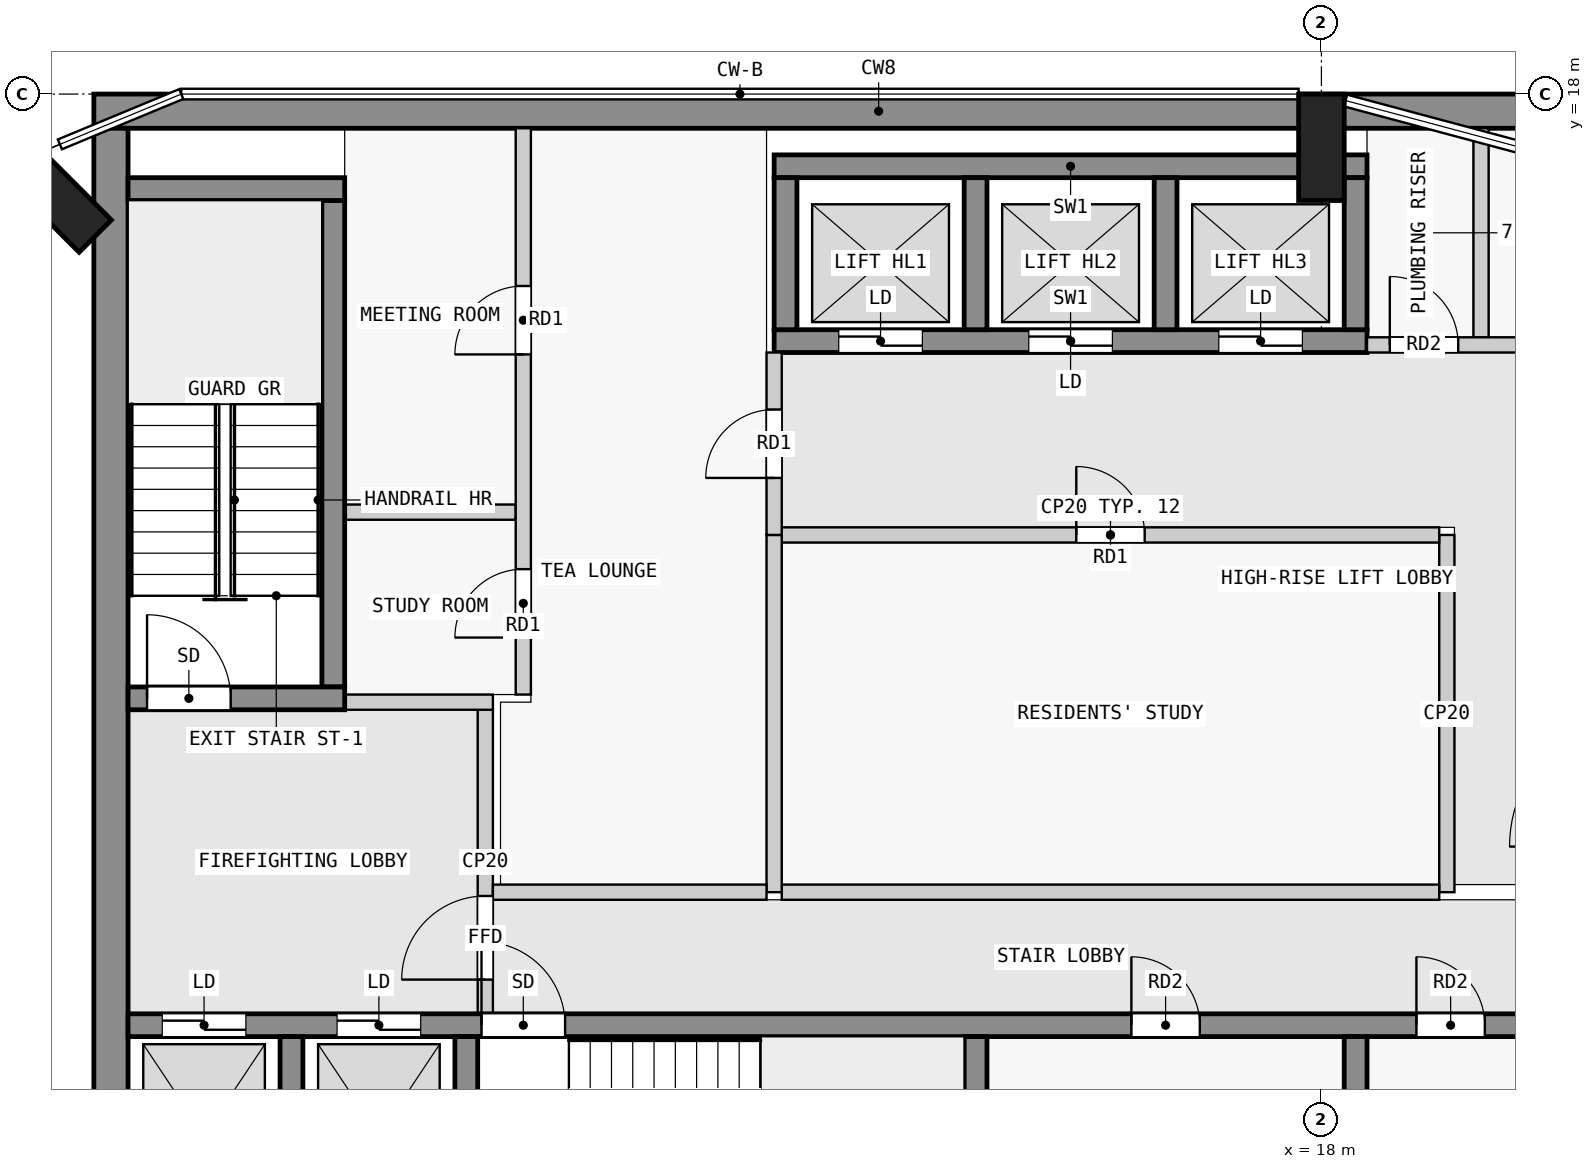
"""IFC4 building model, lengths in metres.
Left out: names, types, materials, properties, quantities, classifications, styles, units other than length and angle.
Written with IfcOpenShell. Run it as: python <this file> out.ifc"""

import sys

from ifc_helpers import new_model, si_unit, direction, frame, frame_2d, origin, origin_2d, place, context, subcontext, project, spatial, rectangle, extrude, element, fill, save


model = new_model("IFC4")
c1 = context("Model", 3, precision=1e-05, world=origin(), true_north=direction((0.0, 1.0)))
c2 = subcontext(c1, "Body", "Model", "MODEL_VIEW")
j1 = project(units=[si_unit("LENGTHUNIT", "METRE"), si_unit("PLANEANGLEUNIT", "RADIAN")], contexts=[c1])
p1 = place(None, origin())
s1 = spatial("IfcSite", under=j1, at=p1, CompositionType="ELEMENT")
p2 = place(p1, origin())
s2 = spatial("IfcBuilding", under=s1, at=p2, CompositionType="ELEMENT")
p3 = place(p2, frame((0.0, 0.0, 270.4)))
s3 = spatial("IfcBuildingStorey", under=s2, at=p3, CompositionType="ELEMENT", Elevation=270.4)
for number, where, z_axis, x_axis in (
    (1, (18.0, 17.3, 0.0), (0.0, 0.0, 1.0), (1.0, 0.0, 0.0)),
    (2, (1.374, 16.626, 0.0), (0.0, 0.0, 1.0), (0.707, 0.707, 0.0)),
):
    element("IfcColumn", number, at=place(p3, frame(where, z_axis=z_axis, x_axis=x_axis)), inside=s3, PredefinedType="COLUMN", context=c2, shape_type="SweptSolid", body=[
        extrude(rectangle(XDim=0.6, YDim=1.4, at=origin_2d()), origin(), (0.0, 0.0, 1.0), 3.5),
    ])
p4 = place(p3, frame((1.85, 17.775, 0.0), z_axis=(0.0, 0.0, 1.0), x_axis=(1.0, 0.0, 0.0)))
e3 = element("IfcWall", 3, at=p4, inside=s3, PredefinedType="SHEAR", context=c2, shape_type="SweptSolid", body=[
    extrude(rectangle(XDim=20.65, YDim=0.45, at=frame_2d((10.325, 0.0))), origin(), (0.0, 0.0, 1.0), 3.25),
])
p5 = place(p3, frame((2.075, 2.5, 0.0), z_axis=(0.0, 0.0, 1.0), x_axis=(0.0, 1.0, 0.0)))
e4 = element("IfcWall", 4, at=p5, inside=s3, PredefinedType="SHEAR", context=c2, shape_type="SweptSolid", body=[
    extrude(rectangle(XDim=15.05, YDim=0.45, at=frame_2d((7.525, 0.0))), origin(), (0.0, 0.0, 1.0), 3.25),
])
for number, where, z_axis, x_axis in (
    (5, (4.45, 2.8, 0.0), (0.0, 0.0, 1.0), (0.0, 1.0, 0.0)),
    (6, (6.75, 2.8, 0.0), (0.0, 0.0, 1.0), (0.0, 1.0, 0.0)),
    (7, (13.45, 2.8, 0.0), (0.0, 0.0, 1.0), (0.0, 1.0, 0.0)),
    (8, (18.45, 2.8, 0.0), (0.0, 0.0, 1.0), (0.0, 1.0, 0.0)),
):
    element("IfcWall", number, at=place(p3, frame(where, z_axis=z_axis, x_axis=x_axis)), inside=s3, PredefinedType="SHEAR", context=c2, shape_type="SweptSolid", body=[
        extrude(rectangle(XDim=2.8, YDim=0.3, at=frame_2d((1.4, 0.0))), origin(), (0.0, 0.0, 1.0), 3.25),
    ])
p6 = place(p3, frame((2.3, 5.75, 0.0), z_axis=(0.0, 0.0, 1.0), x_axis=(1.0, 0.0, 0.0)))
e9 = element("IfcWall", 9, at=p6, inside=s3, PredefinedType="SHEAR", context=c2, shape_type="SweptSolid", body=[
    extrude(rectangle(XDim=18.8, YDim=0.3, at=frame_2d((9.4, 0.0))), origin(), (0.0, 0.0, 1.0), 3.25),
])
p7 = place(p6, frame((4.65, 0.0, 0.0)))
e10 = element("IfcOpeningElement", 10, at=p7, cuts=e9, PredefinedType="OPENING", context=c2, shape_type="SweptSolid", body=[
    extrude(rectangle(XDim=1.1, YDim=2.1, at=frame_2d((0.55, 1.05))), frame((0.0, 0.16, 0.0), z_axis=(0.0, -1.0, 0.0), x_axis=(1.0, 0.0, 0.0)), (0.0, 0.0, 1.0), 0.32),
])
p8 = place(p6, frame((0.45, 0.0, 0.0)))
e11 = element("IfcOpeningElement", 11, at=p8, cuts=e9, PredefinedType="OPENING", context=c2, shape_type="SweptSolid", body=[
    extrude(rectangle(XDim=1.1, YDim=2.1, at=frame_2d((0.55, 1.05))), frame((0.0, 0.16, 0.0), z_axis=(0.0, -1.0, 0.0), x_axis=(1.0, 0.0, 0.0)), (0.0, 0.0, 1.0), 0.32),
])
p9 = place(p6, frame((2.75, 0.0, 0.0)))
e12 = element("IfcOpeningElement", 12, at=p9, cuts=e9, PredefinedType="OPENING", context=c2, shape_type="SweptSolid", body=[
    extrude(rectangle(XDim=1.1, YDim=2.1, at=frame_2d((0.55, 1.05))), frame((0.0, 0.16, 0.0), z_axis=(0.0, -1.0, 0.0), x_axis=(1.0, 0.0, 0.0)), (0.0, 0.0, 1.0), 0.32),
])
p10 = place(p6, frame((13.2, 0.0, 0.0)))
e13 = element("IfcOpeningElement", 13, at=p10, cuts=e9, PredefinedType="OPENING", context=c2, shape_type="SweptSolid", body=[
    extrude(rectangle(XDim=0.9, YDim=2.1, at=frame_2d((0.45, 1.05))), frame((0.0, 0.16, 0.0), z_axis=(0.0, -1.0, 0.0), x_axis=(1.0, 0.0, 0.0)), (0.0, 0.0, 1.0), 0.32),
])
p11 = place(p6, frame((16.95, 0.0, 0.0)))
e14 = element("IfcOpeningElement", 14, at=p11, cuts=e9, PredefinedType="OPENING", context=c2, shape_type="SweptSolid", body=[
    extrude(rectangle(XDim=0.9, YDim=2.1, at=frame_2d((0.45, 1.05))), frame((0.0, 0.16, 0.0), z_axis=(0.0, -1.0, 0.0), x_axis=(1.0, 0.0, 0.0)), (0.0, 0.0, 1.0), 0.32),
])
p12 = place(p3, frame((2.3, 10.05, 0.0), z_axis=(0.0, 0.0, 1.0), x_axis=(1.0, 0.0, 0.0)))
e15 = element("IfcWall", 15, at=p12, inside=s3, PredefinedType="SHEAR", context=c2, shape_type="SweptSolid", body=[
    extrude(rectangle(XDim=2.85, YDim=0.3, at=frame_2d((1.425, 0.0))), origin(), (0.0, 0.0, 1.0), 3.25),
])
p13 = place(p12, frame((0.25, 0.0, 0.0)))
e16 = element("IfcOpeningElement", 16, at=p13, cuts=e15, PredefinedType="OPENING", context=c2, shape_type="SweptSolid", body=[
    extrude(rectangle(XDim=1.1, YDim=2.1, at=frame_2d((0.55, 1.05))), frame((0.0, 0.16, 0.0), z_axis=(0.0, -1.0, 0.0), x_axis=(1.0, 0.0, 0.0)), (0.0, 0.0, 1.0), 0.32),
])
p14 = place(p3, frame((5.0, 10.2, 0.0), z_axis=(0.0, 0.0, 1.0), x_axis=(0.0, 1.0, 0.0)))
e17 = element("IfcWall", 17, at=p14, inside=s3, PredefinedType="SHEAR", context=c2, shape_type="SweptSolid", body=[
    extrude(rectangle(XDim=6.4, YDim=0.3, at=frame_2d((3.2, 0.0))), origin(), (0.0, 0.0, 1.0), 3.25),
])
p15 = place(p3, frame((2.3, 16.75, 0.0), z_axis=(0.0, 0.0, 1.0), x_axis=(1.0, 0.0, 0.0)))
e18 = element("IfcWall", 18, at=p15, inside=s3, PredefinedType="SHEAR", context=c2, shape_type="SweptSolid", body=[
    extrude(rectangle(XDim=2.85, YDim=0.3, at=frame_2d((1.425, 0.0))), origin(), (0.0, 0.0, 1.0), 3.25),
])
p16 = place(p3, frame((10.8, 17.05, 0.0), z_axis=(0.0, 0.0, 1.0), x_axis=(1.0, 0.0, 0.0)))
e19 = element("IfcWall", 19, at=p16, inside=s3, PredefinedType="SHEAR", context=c2, shape_type="SweptSolid", body=[
    extrude(rectangle(XDim=7.8, YDim=0.3, at=frame_2d((3.9, 0.0))), origin(), (0.0, 0.0, 1.0), 3.25),
])
p17 = place(p3, frame((10.8, 14.75, 0.0), z_axis=(0.0, 0.0, 1.0), x_axis=(1.0, 0.0, 0.0)))
e20 = element("IfcWall", 20, at=p17, inside=s3, PredefinedType="SHEAR", context=c2, shape_type="SweptSolid", body=[
    extrude(rectangle(XDim=7.8, YDim=0.3, at=frame_2d((3.9, 0.0))), origin(), (0.0, 0.0, 1.0), 3.25),
])
p18 = place(p17, frame((0.85, 0.0, 0.0)))
e21 = element("IfcOpeningElement", 21, at=p18, cuts=e20, PredefinedType="OPENING", context=c2, shape_type="SweptSolid", body=[
    extrude(rectangle(XDim=1.1, YDim=2.1, at=frame_2d((0.55, 1.05))), frame((0.0, 0.16, 0.0), z_axis=(0.0, -1.0, 0.0), x_axis=(1.0, 0.0, 0.0)), (0.0, 0.0, 1.0), 0.32),
])
p19 = place(p17, frame((3.35, 0.0, 0.0)))
e22 = element("IfcOpeningElement", 22, at=p19, cuts=e20, PredefinedType="OPENING", context=c2, shape_type="SweptSolid", body=[
    extrude(rectangle(XDim=1.1, YDim=2.1, at=frame_2d((0.55, 1.05))), frame((0.0, 0.16, 0.0), z_axis=(0.0, -1.0, 0.0), x_axis=(1.0, 0.0, 0.0)), (0.0, 0.0, 1.0), 0.32),
])
p20 = place(p17, frame((5.85, 0.0, 0.0)))
e23 = element("IfcOpeningElement", 23, at=p20, cuts=e20, PredefinedType="OPENING", context=c2, shape_type="SweptSolid", body=[
    extrude(rectangle(XDim=1.1, YDim=2.1, at=frame_2d((0.55, 1.05))), frame((0.0, 0.16, 0.0), z_axis=(0.0, -1.0, 0.0), x_axis=(1.0, 0.0, 0.0)), (0.0, 0.0, 1.0), 0.32),
])
for number, where, z_axis, x_axis in (
    (24, (10.95, 14.9, 0.0), (0.0, 0.0, 1.0), (0.0, 1.0, 0.0)),
    (25, (13.45, 14.9, 0.0), (0.0, 0.0, 1.0), (0.0, 1.0, 0.0)),
    (26, (15.95, 14.9, 0.0), (0.0, 0.0, 1.0), (0.0, 1.0, 0.0)),
    (27, (18.45, 14.9, 0.0), (0.0, 0.0, 1.0), (0.0, 1.0, 0.0)),
):
    element("IfcWall", number, at=place(p3, frame(where, z_axis=z_axis, x_axis=x_axis)), inside=s3, PredefinedType="SHEAR", context=c2, shape_type="SweptSolid", body=[
        extrude(rectangle(XDim=2.0, YDim=0.3, at=frame_2d((1.0, 0.0))), origin(), (0.0, 0.0, 1.0), 3.25),
    ])
p21 = place(p3, frame((7.0, 5.9, 0.0), z_axis=(0.0, 0.0, 1.0), x_axis=(0.0, 1.0, 0.0)))
e28 = element("IfcWall", 28, at=p21, inside=s3, PredefinedType="PARTITIONING", context=c2, shape_type="SweptSolid", body=[
    extrude(rectangle(XDim=4.0, YDim=0.2, at=frame_2d((2.0, 0.0))), origin(), (0.0, 0.0, 1.0), 3.25),
])
p22 = place(p21, frame((0.45, 0.0, 0.0)))
e29 = element("IfcOpeningElement", 29, at=p22, cuts=e28, PredefinedType="OPENING", context=c2, shape_type="SweptSolid", body=[
    extrude(rectangle(XDim=1.1, YDim=2.1, at=frame_2d((0.55, 1.05))), frame((0.0, 0.11, 0.0), z_axis=(0.0, -1.0, 0.0), x_axis=(1.0, 0.0, 0.0)), (0.0, 0.0, 1.0), 0.22),
])
p23 = place(p3, frame((5.15, 10.0, 0.0), z_axis=(0.0, 0.0, 1.0), x_axis=(1.0, 0.0, 0.0)))
e30 = element("IfcWall", 30, at=p23, inside=s3, PredefinedType="PARTITIONING", context=c2, shape_type="SweptSolid", body=[
    extrude(rectangle(XDim=1.95, YDim=0.2, at=frame_2d((0.975, 0.0))), origin(), (0.0, 0.0, 1.0), 3.25),
])
p24 = place(p3, frame((7.1, 7.5, 0.0), z_axis=(0.0, 0.0, 1.0), x_axis=(1.0, 0.0, 0.0)))
e31 = element("IfcWall", 31, at=p24, inside=s3, PredefinedType="PARTITIONING", context=c2, shape_type="SweptSolid", body=[
    extrude(rectangle(XDim=3.6, YDim=0.2, at=frame_2d((1.8, 0.0))), origin(), (0.0, 0.0, 1.0), 3.25),
])
p25 = place(p3, frame((10.8, 12.2, 0.0), z_axis=(0.0, 0.0, 1.0), x_axis=(0.0, 1.0, 0.0)))
e32 = element("IfcWall", 32, at=p25, inside=s3, PredefinedType="PARTITIONING", context=c2, shape_type="SweptSolid", body=[
    extrude(rectangle(XDim=2.4, YDim=0.2, at=frame_2d((1.2, 0.0))), origin(), (0.0, 0.0, 1.0), 3.25),
])
p26 = place(p25, frame((0.75, 0.0, 0.0)))
e33 = element("IfcOpeningElement", 33, at=p26, cuts=e32, PredefinedType="OPENING", context=c2, shape_type="SweptSolid", body=[
    extrude(rectangle(XDim=0.9, YDim=2.1, at=frame_2d((0.45, 1.05))), frame((0.0, 0.11, 0.0), z_axis=(0.0, -1.0, 0.0), x_axis=(1.0, 0.0, 0.0)), (0.0, 0.0, 1.0), 0.22),
])
p27 = place(p3, frame((10.8, 7.5, 0.0), z_axis=(0.0, 0.0, 1.0), x_axis=(0.0, 1.0, 0.0)))
e34 = element("IfcWall", 34, at=p27, inside=s3, PredefinedType="PARTITIONING", context=c2, shape_type="SweptSolid", body=[
    extrude(rectangle(XDim=4.7, YDim=0.2, at=frame_2d((2.35, 0.0))), origin(), (0.0, 0.0, 1.0), 3.25),
])
p28 = place(p3, frame((10.9, 7.5, 0.0), z_axis=(0.0, 0.0, 1.0), x_axis=(1.0, 0.0, 0.0)))
e35 = element("IfcWall", 35, at=p28, inside=s3, PredefinedType="PARTITIONING", context=c2, shape_type="SweptSolid", body=[
    extrude(rectangle(XDim=8.65, YDim=0.2, at=frame_2d((4.325, 0.0))), origin(), (0.0, 0.0, 1.0), 3.25),
])
p29 = place(p3, frame((19.65, 7.5, 0.0), z_axis=(0.0, 0.0, 1.0), x_axis=(0.0, 1.0, 0.0)))
e36 = element("IfcWall", 36, at=p29, inside=s3, PredefinedType="PARTITIONING", context=c2, shape_type="SweptSolid", body=[
    extrude(rectangle(XDim=4.7, YDim=0.2, at=frame_2d((2.35, 0.0))), origin(), (0.0, 0.0, 1.0), 3.25),
])
p30 = place(p3, frame((10.9, 12.2, 0.0), z_axis=(0.0, 0.0, 1.0), x_axis=(1.0, 0.0, 0.0)))
e37 = element("IfcWall", 37, at=p30, inside=s3, PredefinedType="PARTITIONING", context=c2, shape_type="SweptSolid", body=[
    extrude(rectangle(XDim=8.65, YDim=0.2, at=frame_2d((4.325, 0.0))), origin(), (0.0, 0.0, 1.0), 3.25),
])
p31 = place(p30, frame((3.875, 0.0, 0.0)))
e38 = element("IfcOpeningElement", 38, at=p31, cuts=e37, PredefinedType="OPENING", context=c2, shape_type="SweptSolid", body=[
    extrude(rectangle(XDim=0.9, YDim=2.1, at=frame_2d((0.45, 1.05))), frame((0.0, 0.11, 0.0), z_axis=(0.0, -1.0, 0.0), x_axis=(1.0, 0.0, 0.0)), (0.0, 0.0, 1.0), 0.22),
])
p32 = place(p3, frame((7.5, 10.1, 0.0), z_axis=(0.0, 0.0, 1.0), x_axis=(0.0, 1.0, 0.0)))
e39 = element("IfcWall", 39, at=p32, inside=s3, PredefinedType="PARTITIONING", context=c2, shape_type="SweptSolid", body=[
    extrude(rectangle(XDim=7.45, YDim=0.2, at=frame_2d((3.725, 0.0))), origin(), (0.0, 0.0, 1.0), 3.25),
])
p33 = place(p32, frame((0.75, 0.0, 0.0)))
e40 = element("IfcOpeningElement", 40, at=p33, cuts=e39, PredefinedType="OPENING", context=c2, shape_type="SweptSolid", body=[
    extrude(rectangle(XDim=0.9, YDim=2.1, at=frame_2d((0.45, 1.05))), frame((0.0, 0.11, 0.0), z_axis=(0.0, -1.0, 0.0), x_axis=(1.0, 0.0, 0.0)), (0.0, 0.0, 1.0), 0.22),
])
p34 = place(p32, frame((4.475, 0.0, 0.0)))
e41 = element("IfcOpeningElement", 41, at=p34, cuts=e39, PredefinedType="OPENING", context=c2, shape_type="SweptSolid", body=[
    extrude(rectangle(XDim=0.9, YDim=2.1, at=frame_2d((0.45, 1.05))), frame((0.0, 0.11, 0.0), z_axis=(0.0, -1.0, 0.0), x_axis=(1.0, 0.0, 0.0)), (0.0, 0.0, 1.0), 0.22),
])
p35 = place(p3, frame((5.15, 12.5, 0.0), z_axis=(0.0, 0.0, 1.0), x_axis=(1.0, 0.0, 0.0)))
e42 = element("IfcWall", 42, at=p35, inside=s3, PredefinedType="PARTITIONING", context=c2, shape_type="SweptSolid", body=[
    extrude(rectangle(XDim=2.25, YDim=0.2, at=frame_2d((1.125, 0.0))), origin(), (0.0, 0.0, 1.0), 3.25),
])
p36 = place(p3, frame((18.6, 14.7, 0.0), z_axis=(0.0, 0.0, 1.0), x_axis=(1.0, 0.0, 0.0)))
e43 = element("IfcWall", 43, at=p36, inside=s3, PredefinedType="PARTITIONING", context=c2, shape_type="SweptSolid", body=[
    extrude(rectangle(XDim=3.45, YDim=0.2, at=frame_2d((1.725, 0.0))), origin(), (0.0, 0.0, 1.0), 3.25),
])
p37 = place(p36, frame((0.3, 0.0, 0.0)))
e44 = element("IfcOpeningElement", 44, at=p37, cuts=e43, PredefinedType="OPENING", context=c2, shape_type="SweptSolid", body=[
    extrude(rectangle(XDim=0.9, YDim=2.1, at=frame_2d((0.45, 1.05))), frame((0.0, 0.11, 0.0), z_axis=(0.0, -1.0, 0.0), x_axis=(1.0, 0.0, 0.0)), (0.0, 0.0, 1.0), 0.22),
])
p38 = place(p36, frame((2.025, 0.0, 0.0)))
e45 = element("IfcOpeningElement", 45, at=p38, cuts=e43, PredefinedType="OPENING", context=c2, shape_type="SweptSolid", body=[
    extrude(rectangle(XDim=0.9, YDim=2.1, at=frame_2d((0.45, 1.05))), frame((0.0, 0.11, 0.0), z_axis=(0.0, -1.0, 0.0), x_axis=(1.0, 0.0, 0.0)), (0.0, 0.0, 1.0), 0.22),
])
p39 = place(p3, frame((20.1, 14.8, 0.0), z_axis=(0.0, 0.0, 1.0), x_axis=(0.0, 1.0, 0.0)))
e46 = element("IfcWall", 46, at=p39, inside=s3, PredefinedType="PARTITIONING", context=c2, shape_type="SweptSolid", body=[
    extrude(rectangle(XDim=2.75, YDim=0.2, at=frame_2d((1.375, 0.0))), origin(), (0.0, 0.0, 1.0), 3.25),
])
p40 = place(p22, origin())
e47 = element("IfcDoor", 47, at=p40, inside=s3, OperationType="SINGLE_SWING_LEFT", PredefinedType="DOOR", context=c2, shape_type="SweptSolid", body=[
    extrude(rectangle(XDim=1.1, YDim=2.1, at=frame_2d((0.55, 1.05))), frame((0.0, 0.025, 0.0), z_axis=(0.0, -1.0, 0.0), x_axis=(1.0, 0.0, 0.0)), (0.0, 0.0, 1.0), 0.05),
])
fill(e29, e47)
p41 = place(p13, origin())
e48 = element("IfcDoor", 48, at=p41, inside=s3, OperationType="SINGLE_SWING_RIGHT", PredefinedType="DOOR", context=c2, shape_type="SweptSolid", body=[
    extrude(rectangle(XDim=1.1, YDim=2.1, at=frame_2d((0.55, 1.05))), frame((0.0, 0.025, 0.0), z_axis=(0.0, -1.0, 0.0), x_axis=(1.0, 0.0, 0.0)), (0.0, 0.0, 1.0), 0.05),
])
fill(e16, e48)
p42 = place(p26, origin())
e49 = element("IfcDoor", 49, at=p42, inside=s3, OperationType="SINGLE_SWING_LEFT", PredefinedType="DOOR", context=c2, shape_type="SweptSolid", body=[
    extrude(rectangle(XDim=0.9, YDim=2.1, at=frame_2d((0.45, 1.05))), frame((0.0, 0.025, 0.0), z_axis=(0.0, -1.0, 0.0), x_axis=(1.0, 0.0, 0.0)), (0.0, 0.0, 1.0), 0.05),
])
fill(e33, e49)
p43 = place(p31, origin())
e50 = element("IfcDoor", 50, at=p43, inside=s3, OperationType="SINGLE_SWING_LEFT", PredefinedType="DOOR", context=c2, shape_type="SweptSolid", body=[
    extrude(rectangle(XDim=0.9, YDim=2.1, at=frame_2d((0.45, 1.05))), frame((0.0, 0.025, 0.0), z_axis=(0.0, -1.0, 0.0), x_axis=(1.0, 0.0, 0.0)), (0.0, 0.0, 1.0), 0.05),
])
fill(e38, e50)
p44 = place(p7, origin())
e51 = element("IfcDoor", 51, at=p44, inside=s3, OperationType="SINGLE_SWING_LEFT", PredefinedType="DOOR", context=c2, shape_type="SweptSolid", body=[
    extrude(rectangle(XDim=1.1, YDim=2.1, at=frame_2d((0.55, 1.05))), frame((0.0, 0.025, 0.0), z_axis=(0.0, -1.0, 0.0), x_axis=(1.0, 0.0, 0.0)), (0.0, 0.0, 1.0), 0.05),
])
fill(e10, e51)
p45 = place(p8, origin())
e52 = element("IfcDoor", 52, at=p45, inside=s3, OperationType="DOUBLE_DOOR_SLIDING", PredefinedType="DOOR", context=c2, shape_type="SweptSolid", body=[
    extrude(rectangle(XDim=1.1, YDim=2.1, at=frame_2d((0.55, 1.05))), frame((0.0, 0.025, 0.0), z_axis=(0.0, -1.0, 0.0), x_axis=(1.0, 0.0, 0.0)), (0.0, 0.0, 1.0), 0.05),
])
fill(e11, e52)
p46 = place(p9, origin())
e53 = element("IfcDoor", 53, at=p46, inside=s3, OperationType="DOUBLE_DOOR_SLIDING", PredefinedType="DOOR", context=c2, shape_type="SweptSolid", body=[
    extrude(rectangle(XDim=1.1, YDim=2.1, at=frame_2d((0.55, 1.05))), frame((0.0, 0.025, 0.0), z_axis=(0.0, -1.0, 0.0), x_axis=(1.0, 0.0, 0.0)), (0.0, 0.0, 1.0), 0.05),
])
fill(e12, e53)
p47 = place(p18, origin())
e54 = element("IfcDoor", 54, at=p47, inside=s3, OperationType="DOUBLE_DOOR_SLIDING", PredefinedType="DOOR", context=c2, shape_type="SweptSolid", body=[
    extrude(rectangle(XDim=1.1, YDim=2.1, at=frame_2d((0.55, 1.05))), frame((0.0, 0.025, 0.0), z_axis=(0.0, -1.0, 0.0), x_axis=(1.0, 0.0, 0.0)), (0.0, 0.0, 1.0), 0.05),
])
fill(e21, e54)
p48 = place(p19, origin())
e55 = element("IfcDoor", 55, at=p48, inside=s3, OperationType="DOUBLE_DOOR_SLIDING", PredefinedType="DOOR", context=c2, shape_type="SweptSolid", body=[
    extrude(rectangle(XDim=1.1, YDim=2.1, at=frame_2d((0.55, 1.05))), frame((0.0, 0.025, 0.0), z_axis=(0.0, -1.0, 0.0), x_axis=(1.0, 0.0, 0.0)), (0.0, 0.0, 1.0), 0.05),
])
fill(e22, e55)
p49 = place(p20, origin())
e56 = element("IfcDoor", 56, at=p49, inside=s3, OperationType="DOUBLE_DOOR_SLIDING", PredefinedType="DOOR", context=c2, shape_type="SweptSolid", body=[
    extrude(rectangle(XDim=1.1, YDim=2.1, at=frame_2d((0.55, 1.05))), frame((0.0, 0.025, 0.0), z_axis=(0.0, -1.0, 0.0), x_axis=(1.0, 0.0, 0.0)), (0.0, 0.0, 1.0), 0.05),
])
fill(e23, e56)
p50 = place(p33, origin())
e57 = element("IfcDoor", 57, at=p50, inside=s3, OperationType="SINGLE_SWING_RIGHT", PredefinedType="DOOR", context=c2, shape_type="SweptSolid", body=[
    extrude(rectangle(XDim=0.9, YDim=2.1, at=frame_2d((0.45, 1.05))), frame((0.0, 0.025, 0.0), z_axis=(0.0, -1.0, 0.0), x_axis=(1.0, 0.0, 0.0)), (0.0, 0.0, 1.0), 0.05),
])
fill(e40, e57)
p51 = place(p34, origin())
e58 = element("IfcDoor", 58, at=p51, inside=s3, OperationType="SINGLE_SWING_RIGHT", PredefinedType="DOOR", context=c2, shape_type="SweptSolid", body=[
    extrude(rectangle(XDim=0.9, YDim=2.1, at=frame_2d((0.45, 1.05))), frame((0.0, 0.025, 0.0), z_axis=(0.0, -1.0, 0.0), x_axis=(1.0, 0.0, 0.0)), (0.0, 0.0, 1.0), 0.05),
])
fill(e41, e58)
p52 = place(p37, origin())
e59 = element("IfcDoor", 59, at=p52, inside=s3, OperationType="SINGLE_SWING_LEFT", PredefinedType="DOOR", context=c2, shape_type="SweptSolid", body=[
    extrude(rectangle(XDim=0.9, YDim=2.1, at=frame_2d((0.45, 1.05))), frame((0.0, 0.025, 0.0), z_axis=(0.0, -1.0, 0.0), x_axis=(1.0, 0.0, 0.0)), (0.0, 0.0, 1.0), 0.05),
])
fill(e44, e59)
p53 = place(p10, origin())
e60 = element("IfcDoor", 60, at=p53, inside=s3, OperationType="SINGLE_SWING_LEFT", PredefinedType="DOOR", context=c2, shape_type="SweptSolid", body=[
    extrude(rectangle(XDim=0.9, YDim=2.1, at=frame_2d((0.45, 1.05))), frame((0.0, 0.025, 0.0), z_axis=(0.0, -1.0, 0.0), x_axis=(1.0, 0.0, 0.0)), (0.0, 0.0, 1.0), 0.05),
])
fill(e13, e60)
p54 = place(p11, origin())
e61 = element("IfcDoor", 61, at=p54, inside=s3, OperationType="SINGLE_SWING_LEFT", PredefinedType="DOOR", context=c2, shape_type="SweptSolid", body=[
    extrude(rectangle(XDim=0.9, YDim=2.1, at=frame_2d((0.45, 1.05))), frame((0.0, 0.025, 0.0), z_axis=(0.0, -1.0, 0.0), x_axis=(1.0, 0.0, 0.0)), (0.0, 0.0, 1.0), 0.05),
])
fill(e14, e61)
save(model, sys.argv[1])
